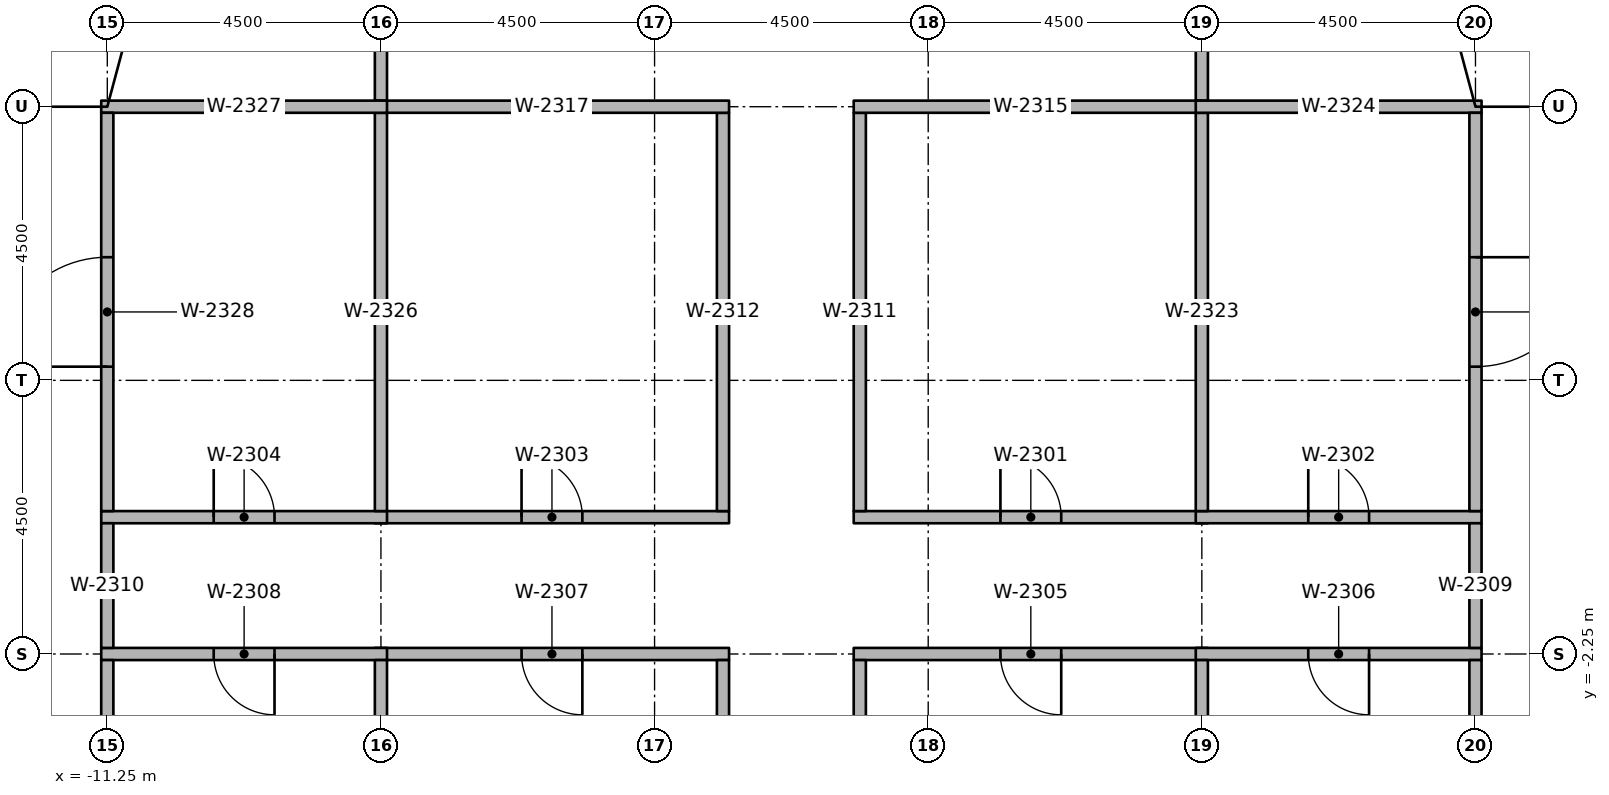
"""IFC4 building model, lengths in metres.
Left out: names, types, materials, properties, quantities, classifications, styles, units other than length and angle.
Written with IfcOpenShell. Run it as: python <this file> out.ifc"""

import sys

from ifc_helpers import new_model, si_unit, direction, frame, frame_2d, origin, origin_2d, place, context, subcontext, project, spatial, rectangle, extrude, element, fill, save


model = new_model("IFC4")
c1 = context("Model", 3, precision=1e-05, world=origin(), true_north=direction((0.0, 1.0)))
c2 = subcontext(c1, "Body", "Model", "MODEL_VIEW")
j1 = project(units=[si_unit("LENGTHUNIT", "METRE"), si_unit("PLANEANGLEUNIT", "RADIAN")], contexts=[c1])
p1 = place(None, origin())
s1 = spatial("IfcSite", under=j1, at=p1, CompositionType="ELEMENT")
p2 = place(p1, origin())
s2 = spatial("IfcBuilding", under=s1, at=p2, CompositionType="ELEMENT")
p3 = place(p2, frame((0.0, 0.0, 218.2)))
s3 = spatial("IfcBuildingStorey", under=s2, at=p3, CompositionType="ELEMENT", Elevation=218.2)
for number, where, z_axis, x_axis in (
    (1, (-10.75, 6.25, 0.0), (0.0, 0.0, 1.0), (1.0, 0.0, 0.0)),
    (2, (-6.25, 6.25, 0.0), (0.0, 0.0, 1.0), (1.0, 0.0, 0.0)),
    (3, (6.25, 6.25, 0.0), (0.0, 0.0, 1.0), (1.0, 0.0, 0.0)),
    (4, (10.75, 6.25, 0.0), (0.0, 0.0, 1.0), (1.0, 0.0, 0.0)),
):
    element("IfcColumn", number, at=place(p3, frame(where, z_axis=z_axis, x_axis=x_axis)), inside=s3, PredefinedType="COLUMN", context=c2, shape_type="SweptSolid", body=[
        extrude(rectangle(XDim=0.7, YDim=0.7, at=origin_2d()), origin(), (0.0, 0.0, 1.0), 3.65),
    ])
p4 = place(p3, frame((1.025, 0.0, 0.0), z_axis=(0.0, 0.0, 1.0), x_axis=(1.0, 0.0, 0.0)))
e5 = element("IfcWall", 5, at=p4, inside=s3, PredefinedType="PARTITIONING", context=c2, shape_type="SweptSolid", body=[
    extrude(rectangle(XDim=5.825, YDim=0.2, at=frame_2d((2.913, 0.0))), origin(), (0.0, 0.0, 1.0), 2.75),
])
p5 = place(p4, frame((2.413, 0.0, 0.0)))
e6 = element("IfcOpeningElement", 6, at=p5, cuts=e5, PredefinedType="OPENING", context=c2, shape_type="SweptSolid", body=[
    extrude(rectangle(XDim=1.0, YDim=2.1, at=frame_2d((0.5, 1.05))), frame((0.0, 0.11, 0.0), z_axis=(0.0, -1.0, 0.0), x_axis=(1.0, 0.0, 0.0)), (0.0, 0.0, 1.0), 0.22),
])
p6 = place(p3, frame((6.65, 0.0, 0.0), z_axis=(0.0, 0.0, 1.0), x_axis=(1.0, 0.0, 0.0)))
e7 = element("IfcWall", 7, at=p6, inside=s3, PredefinedType="PARTITIONING", context=c2, shape_type="SweptSolid", body=[
    extrude(rectangle(XDim=4.7, YDim=0.2, at=frame_2d((2.35, 0.0))), origin(), (0.0, 0.0, 1.0), 2.75),
])
p7 = place(p6, frame((1.85, 0.0, 0.0)))
e8 = element("IfcOpeningElement", 8, at=p7, cuts=e7, PredefinedType="OPENING", context=c2, shape_type="SweptSolid", body=[
    extrude(rectangle(XDim=1.0, YDim=2.1, at=frame_2d((0.5, 1.05))), frame((0.0, 0.11, 0.0), z_axis=(0.0, -1.0, 0.0), x_axis=(1.0, 0.0, 0.0)), (0.0, 0.0, 1.0), 0.22),
])
p8 = place(p3, frame((-6.85, 0.0, 0.0), z_axis=(0.0, 0.0, 1.0), x_axis=(1.0, 0.0, 0.0)))
e9 = element("IfcWall", 9, at=p8, inside=s3, PredefinedType="PARTITIONING", context=c2, shape_type="SweptSolid", body=[
    extrude(rectangle(XDim=5.825, YDim=0.2, at=frame_2d((2.913, 0.0))), origin(), (0.0, 0.0, 1.0), 2.75),
])
p9 = place(p8, frame((2.413, 0.0, 0.0)))
e10 = element("IfcOpeningElement", 10, at=p9, cuts=e9, PredefinedType="OPENING", context=c2, shape_type="SweptSolid", body=[
    extrude(rectangle(XDim=1.0, YDim=2.1, at=frame_2d((0.5, 1.05))), frame((0.0, 0.11, 0.0), z_axis=(0.0, -1.0, 0.0), x_axis=(1.0, 0.0, 0.0)), (0.0, 0.0, 1.0), 0.22),
])
p10 = place(p3, frame((-11.35, 0.0, 0.0), z_axis=(0.0, 0.0, 1.0), x_axis=(1.0, 0.0, 0.0)))
e11 = element("IfcWall", 11, at=p10, inside=s3, PredefinedType="PARTITIONING", context=c2, shape_type="SweptSolid", body=[
    extrude(rectangle(XDim=4.7, YDim=0.2, at=frame_2d((2.35, 0.0))), origin(), (0.0, 0.0, 1.0), 2.75),
])
p11 = place(p10, frame((1.85, 0.0, 0.0)))
e12 = element("IfcOpeningElement", 12, at=p11, cuts=e11, PredefinedType="OPENING", context=c2, shape_type="SweptSolid", body=[
    extrude(rectangle(XDim=1.0, YDim=2.1, at=frame_2d((0.5, 1.05))), frame((0.0, 0.11, 0.0), z_axis=(0.0, -1.0, 0.0), x_axis=(1.0, 0.0, 0.0)), (0.0, 0.0, 1.0), 0.22),
])
p12 = place(p3, frame((6.85, -2.25, 0.0), z_axis=(0.0, 0.0, 1.0), x_axis=(-1.0, 0.0, 0.0)))
e13 = element("IfcWall", 13, at=p12, inside=s3, PredefinedType="PARTITIONING", context=c2, shape_type="SweptSolid", body=[
    extrude(rectangle(XDim=5.825, YDim=0.2, at=frame_2d((2.913, 0.0))), origin(), (0.0, 0.0, 1.0), 2.75),
])
p13 = place(p12, frame((2.413, 0.0, 0.0)))
e14 = element("IfcOpeningElement", 14, at=p13, cuts=e13, PredefinedType="OPENING", context=c2, shape_type="SweptSolid", body=[
    extrude(rectangle(XDim=1.0, YDim=2.1, at=frame_2d((0.5, 1.05))), frame((0.0, 0.11, 0.0), z_axis=(0.0, -1.0, 0.0), x_axis=(1.0, 0.0, 0.0)), (0.0, 0.0, 1.0), 0.22),
])
p14 = place(p3, frame((11.35, -2.25, 0.0), z_axis=(0.0, 0.0, 1.0), x_axis=(-1.0, 0.0, 0.0)))
e15 = element("IfcWall", 15, at=p14, inside=s3, PredefinedType="PARTITIONING", context=c2, shape_type="SweptSolid", body=[
    extrude(rectangle(XDim=4.7, YDim=0.2, at=frame_2d((2.35, 0.0))), origin(), (0.0, 0.0, 1.0), 2.75),
])
p15 = place(p14, frame((1.85, 0.0, 0.0)))
e16 = element("IfcOpeningElement", 16, at=p15, cuts=e15, PredefinedType="OPENING", context=c2, shape_type="SweptSolid", body=[
    extrude(rectangle(XDim=1.0, YDim=2.1, at=frame_2d((0.5, 1.05))), frame((0.0, 0.11, 0.0), z_axis=(0.0, -1.0, 0.0), x_axis=(1.0, 0.0, 0.0)), (0.0, 0.0, 1.0), 0.22),
])
p16 = place(p3, frame((-1.025, -2.25, 0.0), z_axis=(0.0, 0.0, 1.0), x_axis=(-1.0, 0.0, 0.0)))
e17 = element("IfcWall", 17, at=p16, inside=s3, PredefinedType="PARTITIONING", context=c2, shape_type="SweptSolid", body=[
    extrude(rectangle(XDim=5.825, YDim=0.2, at=frame_2d((2.913, 0.0))), origin(), (0.0, 0.0, 1.0), 2.75),
])
p17 = place(p16, frame((2.413, 0.0, 0.0)))
e18 = element("IfcOpeningElement", 18, at=p17, cuts=e17, PredefinedType="OPENING", context=c2, shape_type="SweptSolid", body=[
    extrude(rectangle(XDim=1.0, YDim=2.1, at=frame_2d((0.5, 1.05))), frame((0.0, 0.11, 0.0), z_axis=(0.0, -1.0, 0.0), x_axis=(1.0, 0.0, 0.0)), (0.0, 0.0, 1.0), 0.22),
])
p18 = place(p3, frame((-6.65, -2.25, 0.0), z_axis=(0.0, 0.0, 1.0), x_axis=(-1.0, 0.0, 0.0)))
e19 = element("IfcWall", 19, at=p18, inside=s3, PredefinedType="PARTITIONING", context=c2, shape_type="SweptSolid", body=[
    extrude(rectangle(XDim=4.7, YDim=0.2, at=frame_2d((2.35, 0.0))), origin(), (0.0, 0.0, 1.0), 2.75),
])
p19 = place(p18, frame((1.85, 0.0, 0.0)))
e20 = element("IfcOpeningElement", 20, at=p19, cuts=e19, PredefinedType="OPENING", context=c2, shape_type="SweptSolid", body=[
    extrude(rectangle(XDim=1.0, YDim=2.1, at=frame_2d((0.5, 1.05))), frame((0.0, 0.11, 0.0), z_axis=(0.0, -1.0, 0.0), x_axis=(1.0, 0.0, 0.0)), (0.0, 0.0, 1.0), 0.22),
])
for number, where, z_axis, x_axis in (
    (21, (11.25, -2.15, 0.0), (0.0, 0.0, 1.0), (0.0, 1.0, 0.0)),
    (22, (-11.25, -2.15, 0.0), (0.0, 0.0, 1.0), (0.0, 1.0, 0.0)),
):
    element("IfcWall", number, at=place(p3, frame(where, z_axis=z_axis, x_axis=x_axis)), inside=s3, PredefinedType="PARTITIONING", context=c2, shape_type="SweptSolid", body=[
        extrude(rectangle(XDim=2.05, YDim=0.2, at=frame_2d((1.025, 0.0))), origin(), (0.0, 0.0, 1.0), 2.75),
    ])
for number, where, z_axis, x_axis in (
    (23, (1.125, 0.1, 0.0), (0.0, 0.0, 1.0), (0.0, 1.0, 0.0)),
    (24, (-1.125, 0.1, 0.0), (0.0, 0.0, 1.0), (0.0, 1.0, 0.0)),
):
    element("IfcWall", number, at=place(p3, frame(where, z_axis=z_axis, x_axis=x_axis)), inside=s3, PredefinedType="PARTITIONING", context=c2, shape_type="SweptSolid", body=[
        extrude(rectangle(XDim=6.55, YDim=0.2, at=frame_2d((3.275, 0.0))), origin(), (0.0, 0.0, 1.0), 2.75),
    ])
for number, where, z_axis, x_axis in (
    (25, (1.125, -6.65, 0.0), (0.0, 0.0, 1.0), (0.0, 1.0, 0.0)),
    (26, (-1.125, -6.65, 0.0), (0.0, 0.0, 1.0), (0.0, 1.0, 0.0)),
):
    element("IfcWall", number, at=place(p3, frame(where, z_axis=z_axis, x_axis=x_axis)), inside=s3, PredefinedType="PARTITIONING", context=c2, shape_type="SweptSolid", body=[
        extrude(rectangle(XDim=4.3, YDim=0.2, at=frame_2d((2.15, 0.0))), origin(), (0.0, 0.0, 1.0), 2.75),
    ])
p20 = place(p3, frame((1.025, 6.75, 0.0), z_axis=(0.0, 0.0, 1.0), x_axis=(1.0, 0.0, 0.0)))
e27 = element("IfcWall", 27, at=p20, inside=s3, PredefinedType="PARTITIONING", context=c2, shape_type="SweptSolid", body=[
    extrude(rectangle(XDim=5.825, YDim=0.2, at=frame_2d((2.913, 0.0))), origin(), (0.0, 0.0, 1.0), 2.75),
])
p21 = place(p3, frame((6.75, 10.63, 0.0), z_axis=(0.0, 0.0, 1.0), x_axis=(0.0, -1.0, 0.0)))
e28 = element("IfcWall", 28, at=p21, inside=s3, PredefinedType="PARTITIONING", context=c2, shape_type="SweptSolid", body=[
    extrude(rectangle(XDim=3.78, YDim=0.2, at=frame_2d((1.89, 0.0))), origin(), (0.0, 0.0, 1.0), 2.75),
])
p22 = place(p21, frame((1.44, 0.0, 0.0)))
e29 = element("IfcOpeningElement", 29, at=p22, cuts=e28, PredefinedType="OPENING", context=c2, shape_type="SweptSolid", body=[
    extrude(rectangle(XDim=0.9, YDim=2.1, at=frame_2d((0.45, 1.05))), frame((0.0, 0.11, 0.0), z_axis=(0.0, -1.0, 0.0), x_axis=(1.0, 0.0, 0.0)), (0.0, 0.0, 1.0), 0.22),
])
p23 = place(p3, frame((-6.85, 6.75, 0.0), z_axis=(0.0, 0.0, 1.0), x_axis=(1.0, 0.0, 0.0)))
e30 = element("IfcWall", 30, at=p23, inside=s3, PredefinedType="PARTITIONING", context=c2, shape_type="SweptSolid", body=[
    extrude(rectangle(XDim=5.825, YDim=0.2, at=frame_2d((2.913, 0.0))), origin(), (0.0, 0.0, 1.0), 2.75),
])
p24 = place(p3, frame((-6.75, 6.85, 0.0), z_axis=(0.0, 0.0, 1.0), x_axis=(0.0, 1.0, 0.0)))
e31 = element("IfcWall", 31, at=p24, inside=s3, PredefinedType="PARTITIONING", context=c2, shape_type="SweptSolid", body=[
    extrude(rectangle(XDim=3.78, YDim=0.2, at=frame_2d((1.89, 0.0))), origin(), (0.0, 0.0, 1.0), 2.75),
])
p25 = place(p24, frame((1.44, 0.0, 0.0)))
e32 = element("IfcOpeningElement", 32, at=p25, cuts=e31, PredefinedType="OPENING", context=c2, shape_type="SweptSolid", body=[
    extrude(rectangle(XDim=0.9, YDim=2.1, at=frame_2d((0.45, 1.05))), frame((0.0, 0.11, 0.0), z_axis=(0.0, -1.0, 0.0), x_axis=(1.0, 0.0, 0.0)), (0.0, 0.0, 1.0), 0.22),
])
p26 = place(p3, frame((6.75, 0.1, 0.0), z_axis=(0.0, 0.0, 1.0), x_axis=(0.0, 1.0, 0.0)))
e33 = element("IfcWall", 33, at=p26, inside=s3, PredefinedType="PARTITIONING", context=c2, shape_type="SweptSolid", body=[
    extrude(rectangle(XDim=6.55, YDim=0.2, at=frame_2d((3.275, 0.0))), origin(), (0.0, 0.0, 1.0), 2.75),
])
p27 = place(p3, frame((6.65, 6.75, 0.0), z_axis=(0.0, 0.0, 1.0), x_axis=(1.0, 0.0, 0.0)))
e34 = element("IfcWall", 34, at=p27, inside=s3, PredefinedType="PARTITIONING", context=c2, shape_type="SweptSolid", body=[
    extrude(rectangle(XDim=4.7, YDim=0.2, at=frame_2d((2.35, 0.0))), origin(), (0.0, 0.0, 1.0), 2.75),
])
p28 = place(p3, frame((11.25, 6.65, 0.0), z_axis=(0.0, 0.0, 1.0), x_axis=(0.0, -1.0, 0.0)))
e35 = element("IfcWall", 35, at=p28, inside=s3, PredefinedType="PARTITIONING", context=c2, shape_type="SweptSolid", body=[
    extrude(rectangle(XDim=6.55, YDim=0.2, at=frame_2d((3.275, 0.0))), origin(), (0.0, 0.0, 1.0), 2.75),
])
p29 = place(p28, frame((2.375, 0.0, 0.0)))
e36 = element("IfcOpeningElement", 36, at=p29, cuts=e35, PredefinedType="OPENING", context=c2, shape_type="SweptSolid", body=[
    extrude(rectangle(XDim=1.8, YDim=2.1, at=frame_2d((0.9, 1.05))), frame((0.0, 0.11, 0.0), z_axis=(0.0, -1.0, 0.0), x_axis=(1.0, 0.0, 0.0)), (0.0, 0.0, 1.0), 0.22),
])
p30 = place(p3, frame((-6.75, 0.1, 0.0), z_axis=(0.0, 0.0, 1.0), x_axis=(0.0, 1.0, 0.0)))
e37 = element("IfcWall", 37, at=p30, inside=s3, PredefinedType="PARTITIONING", context=c2, shape_type="SweptSolid", body=[
    extrude(rectangle(XDim=6.55, YDim=0.2, at=frame_2d((3.275, 0.0))), origin(), (0.0, 0.0, 1.0), 2.75),
])
p31 = place(p3, frame((-11.35, 6.75, 0.0), z_axis=(0.0, 0.0, 1.0), x_axis=(1.0, 0.0, 0.0)))
e38 = element("IfcWall", 38, at=p31, inside=s3, PredefinedType="PARTITIONING", context=c2, shape_type="SweptSolid", body=[
    extrude(rectangle(XDim=4.7, YDim=0.2, at=frame_2d((2.35, 0.0))), origin(), (0.0, 0.0, 1.0), 2.75),
])
p32 = place(p3, frame((-11.25, 0.1, 0.0), z_axis=(0.0, 0.0, 1.0), x_axis=(0.0, 1.0, 0.0)))
e39 = element("IfcWall", 39, at=p32, inside=s3, PredefinedType="PARTITIONING", context=c2, shape_type="SweptSolid", body=[
    extrude(rectangle(XDim=6.55, YDim=0.2, at=frame_2d((3.275, 0.0))), origin(), (0.0, 0.0, 1.0), 2.75),
])
p33 = place(p32, frame((2.375, 0.0, 0.0)))
e40 = element("IfcOpeningElement", 40, at=p33, cuts=e39, PredefinedType="OPENING", context=c2, shape_type="SweptSolid", body=[
    extrude(rectangle(XDim=1.8, YDim=2.1, at=frame_2d((0.9, 1.05))), frame((0.0, 0.11, 0.0), z_axis=(0.0, -1.0, 0.0), x_axis=(1.0, 0.0, 0.0)), (0.0, 0.0, 1.0), 0.22),
])
for number, where, z_axis, x_axis in (
    (41, (6.75, -6.65, 0.0), (0.0, 0.0, 1.0), (0.0, 1.0, 0.0)),
    (42, (11.25, -6.65, 0.0), (0.0, 0.0, 1.0), (0.0, 1.0, 0.0)),
    (43, (-6.75, -6.65, 0.0), (0.0, 0.0, 1.0), (0.0, 1.0, 0.0)),
):
    element("IfcWall", number, at=place(p3, frame(where, z_axis=z_axis, x_axis=x_axis)), inside=s3, PredefinedType="PARTITIONING", context=c2, shape_type="SweptSolid", body=[
        extrude(rectangle(XDim=4.3, YDim=0.2, at=frame_2d((2.15, 0.0))), origin(), (0.0, 0.0, 1.0), 2.75),
    ])
p34 = place(p3, frame((-11.25, -6.17, 0.0), z_axis=(0.0, 0.0, 1.0), x_axis=(0.0, 1.0, 0.0)))
e44 = element("IfcWall", 44, at=p34, inside=s3, PredefinedType="PARTITIONING", context=c2, shape_type="SweptSolid", body=[
    extrude(rectangle(XDim=3.82, YDim=0.2, at=frame_2d((1.91, 0.0))), origin(), (0.0, 0.0, 1.0), 2.75),
])
p35 = place(p29, origin())
e45 = element("IfcDoor", 45, at=p35, inside=s3, OperationType="DOUBLE_DOOR_SINGLE_SWING", PredefinedType="DOOR", context=c2, shape_type="SweptSolid", body=[
    extrude(rectangle(XDim=1.8, YDim=2.1, at=frame_2d((0.9, 1.05))), frame((0.0, 0.025, 0.0), z_axis=(0.0, -1.0, 0.0), x_axis=(1.0, 0.0, 0.0)), (0.0, 0.0, 1.0), 0.05),
])
fill(e36, e45)
p36 = place(p5, origin())
e46 = element("IfcDoor", 46, at=p36, inside=s3, OperationType="SINGLE_SWING_RIGHT", PredefinedType="DOOR", context=c2, shape_type="SweptSolid", body=[
    extrude(rectangle(XDim=1.0, YDim=2.1, at=frame_2d((0.5, 1.05))), frame((0.0, 0.025, 0.0), z_axis=(0.0, -1.0, 0.0), x_axis=(1.0, 0.0, 0.0)), (0.0, 0.0, 1.0), 0.05),
])
fill(e6, e46)
p37 = place(p7, origin())
e47 = element("IfcDoor", 47, at=p37, inside=s3, OperationType="SINGLE_SWING_RIGHT", PredefinedType="DOOR", context=c2, shape_type="SweptSolid", body=[
    extrude(rectangle(XDim=1.0, YDim=2.1, at=frame_2d((0.5, 1.05))), frame((0.0, 0.025, 0.0), z_axis=(0.0, -1.0, 0.0), x_axis=(1.0, 0.0, 0.0)), (0.0, 0.0, 1.0), 0.05),
])
fill(e8, e47)
p38 = place(p9, origin())
e48 = element("IfcDoor", 48, at=p38, inside=s3, OperationType="SINGLE_SWING_RIGHT", PredefinedType="DOOR", context=c2, shape_type="SweptSolid", body=[
    extrude(rectangle(XDim=1.0, YDim=2.1, at=frame_2d((0.5, 1.05))), frame((0.0, 0.025, 0.0), z_axis=(0.0, -1.0, 0.0), x_axis=(1.0, 0.0, 0.0)), (0.0, 0.0, 1.0), 0.05),
])
fill(e10, e48)
p39 = place(p11, origin())
e49 = element("IfcDoor", 49, at=p39, inside=s3, OperationType="SINGLE_SWING_RIGHT", PredefinedType="DOOR", context=c2, shape_type="SweptSolid", body=[
    extrude(rectangle(XDim=1.0, YDim=2.1, at=frame_2d((0.5, 1.05))), frame((0.0, 0.025, 0.0), z_axis=(0.0, -1.0, 0.0), x_axis=(1.0, 0.0, 0.0)), (0.0, 0.0, 1.0), 0.05),
])
fill(e12, e49)
p40 = place(p13, origin())
e50 = element("IfcDoor", 50, at=p40, inside=s3, OperationType="SINGLE_SWING_RIGHT", PredefinedType="DOOR", context=c2, shape_type="SweptSolid", body=[
    extrude(rectangle(XDim=1.0, YDim=2.1, at=frame_2d((0.5, 1.05))), frame((0.0, 0.025, 0.0), z_axis=(0.0, -1.0, 0.0), x_axis=(1.0, 0.0, 0.0)), (0.0, 0.0, 1.0), 0.05),
])
fill(e14, e50)
p41 = place(p15, origin())
e51 = element("IfcDoor", 51, at=p41, inside=s3, OperationType="SINGLE_SWING_RIGHT", PredefinedType="DOOR", context=c2, shape_type="SweptSolid", body=[
    extrude(rectangle(XDim=1.0, YDim=2.1, at=frame_2d((0.5, 1.05))), frame((0.0, 0.025, 0.0), z_axis=(0.0, -1.0, 0.0), x_axis=(1.0, 0.0, 0.0)), (0.0, 0.0, 1.0), 0.05),
])
fill(e16, e51)
p42 = place(p17, origin())
e52 = element("IfcDoor", 52, at=p42, inside=s3, OperationType="SINGLE_SWING_RIGHT", PredefinedType="DOOR", context=c2, shape_type="SweptSolid", body=[
    extrude(rectangle(XDim=1.0, YDim=2.1, at=frame_2d((0.5, 1.05))), frame((0.0, 0.025, 0.0), z_axis=(0.0, -1.0, 0.0), x_axis=(1.0, 0.0, 0.0)), (0.0, 0.0, 1.0), 0.05),
])
fill(e18, e52)
p43 = place(p19, origin())
e53 = element("IfcDoor", 53, at=p43, inside=s3, OperationType="SINGLE_SWING_RIGHT", PredefinedType="DOOR", context=c2, shape_type="SweptSolid", body=[
    extrude(rectangle(XDim=1.0, YDim=2.1, at=frame_2d((0.5, 1.05))), frame((0.0, 0.025, 0.0), z_axis=(0.0, -1.0, 0.0), x_axis=(1.0, 0.0, 0.0)), (0.0, 0.0, 1.0), 0.05),
])
fill(e20, e53)
p44 = place(p33, origin())
e54 = element("IfcDoor", 54, at=p44, inside=s3, OperationType="DOUBLE_DOOR_SINGLE_SWING", PredefinedType="DOOR", context=c2, shape_type="SweptSolid", body=[
    extrude(rectangle(XDim=1.8, YDim=2.1, at=frame_2d((0.9, 1.05))), frame((0.0, 0.025, 0.0), z_axis=(0.0, -1.0, 0.0), x_axis=(1.0, 0.0, 0.0)), (0.0, 0.0, 1.0), 0.05),
])
fill(e40, e54)
save(model, sys.argv[1])
